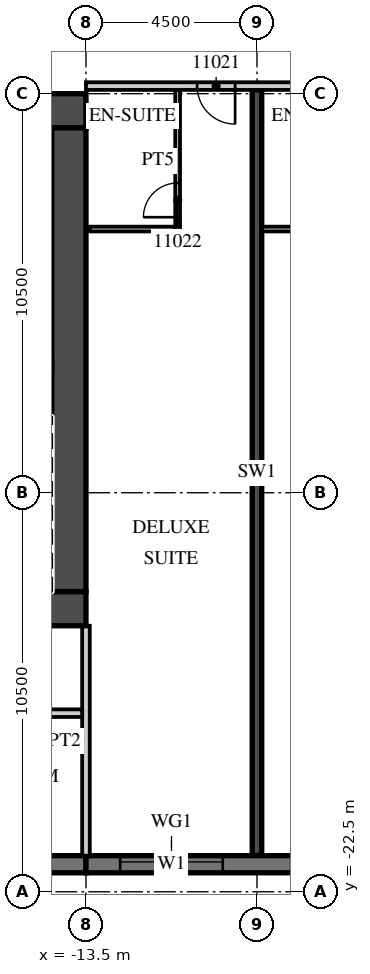
"""IFC4 building model, lengths in metres.
Left out: names, types, materials, properties, quantities, classifications, styles, units other than length and angle.
Written with IfcOpenShell. Run it as: python <this file> out.ifc"""

import sys

from ifc_helpers import new_model, si_unit, direction, frame, frame_2d, origin, place, context, subcontext, project, spatial, rectangle, extrude, element, fill, save


model = new_model("IFC4")
c1 = context("Model", 3, precision=1e-05, world=origin(), true_north=direction((0.0, 1.0)))
c2 = subcontext(c1, "Body", "Model", "MODEL_VIEW")
j1 = project(units=[si_unit("LENGTHUNIT", "METRE"), si_unit("PLANEANGLEUNIT", "RADIAN")], contexts=[c1])
p1 = place(None, origin())
s1 = spatial("IfcSite", under=j1, at=p1, CompositionType="ELEMENT")
p2 = place(p1, origin())
s2 = spatial("IfcBuilding", under=s1, at=p2, CompositionType="ELEMENT")
p3 = place(p2, frame((0.0, 0.0, 66.6)))
s3 = spatial("IfcBuildingStorey", under=s2, at=p3, CompositionType="ELEMENT", Elevation=66.6)
p4 = place(p3, frame((-9.0, -21.54, 0.0), z_axis=(0.0, 0.0, 1.0), x_axis=(0.0, 1.0, 0.0)))
e1 = element("IfcWall", 1, at=p4, inside=s3, PredefinedType="SHEAR", context=c2, shape_type="SweptSolid", body=[
    extrude(rectangle(XDim=20.14, YDim=0.25, at=frame_2d((10.07, 0.0))), origin(), (0.0, 0.0, 1.0), 3.3),
])
p5 = place(p3, frame((-31.5, -21.775, 0.0), z_axis=(0.0, 0.0, 1.0), x_axis=(1.0, 0.0, 0.0)))
e2 = element("IfcWall", 2, at=p5, inside=s3, PredefinedType="SOLIDWALL", context=c2, shape_type="SweptSolid", body=[
    extrude(rectangle(XDim=18.0, YDim=0.45, at=frame_2d((9.0, 0.0))), origin(), (0.0, 0.0, 1.0), 3.02),
])
p6 = place(p3, frame((-13.5, -21.775, 0.0), z_axis=(0.0, 0.0, 1.0), x_axis=(1.0, 0.0, 0.0)))
e3 = element("IfcWall", 3, at=p6, inside=s3, PredefinedType="SOLIDWALL", context=c2, shape_type="SweptSolid", body=[
    extrude(rectangle(XDim=54.5, YDim=0.45, at=frame_2d((27.25, 0.0))), origin(), (0.0, 0.0, 1.0), 3.02),
])
p7 = place(p6, frame((0.9, 0.0, 0.45)))
e4 = element("IfcOpeningElement", 4, at=p7, cuts=e3, PredefinedType="OPENING", context=c2, shape_type="SweptSolid", body=[
    extrude(rectangle(XDim=2.7, YDim=2.25, at=frame_2d((1.35, 1.125))), frame((0.0, 0.235, 0.0), z_axis=(0.0, -1.0, 0.0), x_axis=(1.0, 0.0, 0.0)), (0.0, 0.0, 1.0), 0.47),
])
p8 = place(p6, frame((5.4, 0.0, 0.45)))
e5 = element("IfcOpeningElement", 5, at=p8, cuts=e3, PredefinedType="OPENING", context=c2, shape_type="SweptSolid", body=[
    extrude(rectangle(XDim=2.7, YDim=2.25, at=frame_2d((1.35, 1.125))), frame((0.0, 0.235, 0.0), z_axis=(0.0, -1.0, 0.0), x_axis=(1.0, 0.0, 0.0)), (0.0, 0.0, 1.0), 0.47),
])
p9 = place(p6, frame((9.9, 0.0, 0.45)))
e6 = element("IfcOpeningElement", 6, at=p9, cuts=e3, PredefinedType="OPENING", context=c2, shape_type="SweptSolid", body=[
    extrude(rectangle(XDim=2.7, YDim=2.25, at=frame_2d((1.35, 1.125))), frame((0.0, 0.235, 0.0), z_axis=(0.0, -1.0, 0.0), x_axis=(1.0, 0.0, 0.0)), (0.0, 0.0, 1.0), 0.47),
])
p10 = place(p6, frame((14.4, 0.0, 0.45)))
e7 = element("IfcOpeningElement", 7, at=p10, cuts=e3, PredefinedType="OPENING", context=c2, shape_type="SweptSolid", body=[
    extrude(rectangle(XDim=2.7, YDim=2.25, at=frame_2d((1.35, 1.125))), frame((0.0, 0.235, 0.0), z_axis=(0.0, -1.0, 0.0), x_axis=(1.0, 0.0, 0.0)), (0.0, 0.0, 1.0), 0.47),
])
p11 = place(p6, frame((18.9, 0.0, 0.45)))
e8 = element("IfcOpeningElement", 8, at=p11, cuts=e3, PredefinedType="OPENING", context=c2, shape_type="SweptSolid", body=[
    extrude(rectangle(XDim=2.7, YDim=2.25, at=frame_2d((1.35, 1.125))), frame((0.0, 0.235, 0.0), z_axis=(0.0, -1.0, 0.0), x_axis=(1.0, 0.0, 0.0)), (0.0, 0.0, 1.0), 0.47),
])
p12 = place(p6, frame((23.4, 0.0, 0.45)))
e9 = element("IfcOpeningElement", 9, at=p12, cuts=e3, PredefinedType="OPENING", context=c2, shape_type="SweptSolid", body=[
    extrude(rectangle(XDim=2.7, YDim=2.25, at=frame_2d((1.35, 1.125))), frame((0.0, 0.235, 0.0), z_axis=(0.0, -1.0, 0.0), x_axis=(1.0, 0.0, 0.0)), (0.0, 0.0, 1.0), 0.47),
])
p13 = place(p6, frame((27.9, 0.0, 0.45)))
e10 = element("IfcOpeningElement", 10, at=p13, cuts=e3, PredefinedType="OPENING", context=c2, shape_type="SweptSolid", body=[
    extrude(rectangle(XDim=2.7, YDim=2.25, at=frame_2d((1.35, 1.125))), frame((0.0, 0.235, 0.0), z_axis=(0.0, -1.0, 0.0), x_axis=(1.0, 0.0, 0.0)), (0.0, 0.0, 1.0), 0.47),
])
p14 = place(p6, frame((32.4, 0.0, 0.45)))
e11 = element("IfcOpeningElement", 11, at=p14, cuts=e3, PredefinedType="OPENING", context=c2, shape_type="SweptSolid", body=[
    extrude(rectangle(XDim=2.7, YDim=2.25, at=frame_2d((1.35, 1.125))), frame((0.0, 0.235, 0.0), z_axis=(0.0, -1.0, 0.0), x_axis=(1.0, 0.0, 0.0)), (0.0, 0.0, 1.0), 0.47),
])
p15 = place(p6, frame((36.9, 0.0, 0.45)))
e12 = element("IfcOpeningElement", 12, at=p15, cuts=e3, PredefinedType="OPENING", context=c2, shape_type="SweptSolid", body=[
    extrude(rectangle(XDim=2.7, YDim=2.25, at=frame_2d((1.35, 1.125))), frame((0.0, 0.235, 0.0), z_axis=(0.0, -1.0, 0.0), x_axis=(1.0, 0.0, 0.0)), (0.0, 0.0, 1.0), 0.47),
])
p16 = place(p6, frame((41.4, 0.0, 0.45)))
e13 = element("IfcOpeningElement", 13, at=p16, cuts=e3, PredefinedType="OPENING", context=c2, shape_type="SweptSolid", body=[
    extrude(rectangle(XDim=2.7, YDim=2.25, at=frame_2d((1.35, 1.125))), frame((0.0, 0.235, 0.0), z_axis=(0.0, -1.0, 0.0), x_axis=(1.0, 0.0, 0.0)), (0.0, 0.0, 1.0), 0.47),
])
p17 = place(p6, frame((45.9, 0.0, 0.45)))
e14 = element("IfcOpeningElement", 14, at=p17, cuts=e3, PredefinedType="OPENING", context=c2, shape_type="SweptSolid", body=[
    extrude(rectangle(XDim=2.7, YDim=2.25, at=frame_2d((1.35, 1.125))), frame((0.0, 0.235, 0.0), z_axis=(0.0, -1.0, 0.0), x_axis=(1.0, 0.0, 0.0)), (0.0, 0.0, 1.0), 0.47),
])
p18 = place(p6, frame((50.4, 0.0, 0.45)))
e15 = element("IfcOpeningElement", 15, at=p18, cuts=e3, PredefinedType="OPENING", context=c2, shape_type="SweptSolid", body=[
    extrude(rectangle(XDim=2.7, YDim=2.25, at=frame_2d((1.35, 1.125))), frame((0.0, 0.235, 0.0), z_axis=(0.0, -1.0, 0.0), x_axis=(1.0, 0.0, 0.0)), (0.0, 0.0, 1.0), 0.47),
])
p19 = place(p3, frame((-13.5, -21.55, 0.0), z_axis=(0.0, 0.0, 1.0), x_axis=(0.0, 1.0, 0.0)))
e16 = element("IfcWall", 16, at=p19, inside=s3, PredefinedType="PARTITIONING", context=c2, shape_type="SweptSolid", body=[
    extrude(rectangle(XDim=6.05, YDim=0.2, at=frame_2d((3.025, 0.0))), origin(), (0.0, 0.0, 1.0), 3.02),
])
p20 = place(p3, frame((-13.5, -1.3, 0.0), z_axis=(0.0, 0.0, 1.0), x_axis=(1.0, 0.0, 0.0)))
e17 = element("IfcWall", 17, at=p20, inside=s3, PredefinedType="PARTITIONING", context=c2, shape_type="SweptSolid", body=[
    extrude(rectangle(XDim=58.05, YDim=0.2, at=frame_2d((29.025, 0.0))), origin(), (0.0, 0.0, 1.0), 3.02),
])
p21 = place(p20, frame((2.925, 0.0, 0.0)))
e18 = element("IfcOpeningElement", 18, at=p21, cuts=e17, PredefinedType="OPENING", context=c2, shape_type="SweptSolid", body=[
    extrude(rectangle(XDim=1.0, YDim=2.1, at=frame_2d((0.5, 1.05))), frame((0.0, 0.11, 0.0), z_axis=(0.0, -1.0, 0.0), x_axis=(1.0, 0.0, 0.0)), (0.0, 0.0, 1.0), 0.22),
])
p22 = place(p20, frame((9.863, 0.0, 0.0)))
e19 = element("IfcOpeningElement", 19, at=p22, cuts=e17, PredefinedType="OPENING", context=c2, shape_type="SweptSolid", body=[
    extrude(rectangle(XDim=1.2, YDim=2.1, at=frame_2d((0.6, 1.05))), frame((0.0, 0.11, 0.0), z_axis=(0.0, -1.0, 0.0), x_axis=(1.0, 0.0, 0.0)), (0.0, 0.0, 1.0), 0.22),
])
p23 = place(p20, frame((16.45, 0.0, 0.0)))
e20 = element("IfcOpeningElement", 20, at=p23, cuts=e17, PredefinedType="OPENING", context=c2, shape_type="SweptSolid", body=[
    extrude(rectangle(XDim=1.0, YDim=2.1, at=frame_2d((0.5, 1.05))), frame((0.0, 0.11, 0.0), z_axis=(0.0, -1.0, 0.0), x_axis=(1.0, 0.0, 0.0)), (0.0, 0.0, 1.0), 0.22),
])
p24 = place(p20, frame((18.55, 0.0, 0.0)))
e21 = element("IfcOpeningElement", 21, at=p24, cuts=e17, PredefinedType="OPENING", context=c2, shape_type="SweptSolid", body=[
    extrude(rectangle(XDim=1.0, YDim=2.1, at=frame_2d((0.5, 1.05))), frame((0.0, 0.11, 0.0), z_axis=(0.0, -1.0, 0.0), x_axis=(1.0, 0.0, 0.0)), (0.0, 0.0, 1.0), 0.22),
])
p25 = place(p20, frame((24.938, 0.0, 0.0)))
e22 = element("IfcOpeningElement", 22, at=p25, cuts=e17, PredefinedType="OPENING", context=c2, shape_type="SweptSolid", body=[
    extrude(rectangle(XDim=1.2, YDim=2.1, at=frame_2d((0.6, 1.05))), frame((0.0, 0.11, 0.0), z_axis=(0.0, -1.0, 0.0), x_axis=(1.0, 0.0, 0.0)), (0.0, 0.0, 1.0), 0.22),
])
p26 = place(p20, frame((33.938, 0.0, 0.0)))
e23 = element("IfcOpeningElement", 23, at=p26, cuts=e17, PredefinedType="OPENING", context=c2, shape_type="SweptSolid", body=[
    extrude(rectangle(XDim=1.2, YDim=2.1, at=frame_2d((0.6, 1.05))), frame((0.0, 0.11, 0.0), z_axis=(0.0, -1.0, 0.0), x_axis=(1.0, 0.0, 0.0)), (0.0, 0.0, 1.0), 0.22),
])
p27 = place(p20, frame((42.938, 0.0, 0.0)))
e24 = element("IfcOpeningElement", 24, at=p27, cuts=e17, PredefinedType="OPENING", context=c2, shape_type="SweptSolid", body=[
    extrude(rectangle(XDim=1.2, YDim=2.1, at=frame_2d((0.6, 1.05))), frame((0.0, 0.11, 0.0), z_axis=(0.0, -1.0, 0.0), x_axis=(1.0, 0.0, 0.0)), (0.0, 0.0, 1.0), 0.22),
])
p28 = place(p20, frame((52.425, 0.0, 0.0)))
e25 = element("IfcOpeningElement", 25, at=p28, cuts=e17, PredefinedType="OPENING", context=c2, shape_type="SweptSolid", body=[
    extrude(rectangle(XDim=1.0, YDim=2.1, at=frame_2d((0.5, 1.05))), frame((0.0, 0.11, 0.0), z_axis=(0.0, -1.0, 0.0), x_axis=(1.0, 0.0, 0.0)), (0.0, 0.0, 1.0), 0.22),
])
p29 = place(p20, frame((56.525, 0.0, 0.0)))
e26 = element("IfcOpeningElement", 26, at=p29, cuts=e17, PredefinedType="OPENING", context=c2, shape_type="SweptSolid", body=[
    extrude(rectangle(XDim=1.0, YDim=2.1, at=frame_2d((0.5, 1.05))), frame((0.0, 0.11, 0.0), z_axis=(0.0, -1.0, 0.0), x_axis=(1.0, 0.0, 0.0)), (0.0, 0.0, 1.0), 0.22),
])
p30 = place(p3, frame((-11.088, -5.125, 0.0), z_axis=(0.0, 0.0, 1.0), x_axis=(0.0, 1.0, 0.0)))
e27 = element("IfcWall", 27, at=p30, inside=s3, PredefinedType="PARTITIONING", context=c2, shape_type="SweptSolid", body=[
    extrude(rectangle(XDim=3.725, YDim=0.125, at=frame_2d((1.863, 0.0))), origin(), (0.0, 0.0, 1.0), 3.02),
])
p31 = place(p30, frame((0.375, 0.0, 0.0)))
e28 = element("IfcOpeningElement", 28, at=p31, cuts=e27, PredefinedType="OPENING", context=c2, shape_type="SweptSolid", body=[
    extrude(rectangle(XDim=0.9, YDim=2.1, at=frame_2d((0.45, 1.05))), frame((0.0, 0.073, 0.0), z_axis=(0.0, -1.0, 0.0), x_axis=(1.0, 0.0, 0.0)), (0.0, 0.0, 1.0), 0.145),
])
p32 = place(p3, frame((-13.4, -5.062, 0.0), z_axis=(0.0, 0.0, 1.0), x_axis=(1.0, 0.0, 0.0)))
e29 = element("IfcWall", 29, at=p32, inside=s3, PredefinedType="PARTITIONING", context=c2, shape_type="SweptSolid", body=[
    extrude(rectangle(XDim=2.25, YDim=0.125, at=frame_2d((1.125, 0.0))), origin(), (0.0, 0.0, 1.0), 3.02),
])
p33 = place(p3, frame((-8.875, -5.062, 0.0), z_axis=(0.0, 0.0, 1.0), x_axis=(1.0, 0.0, 0.0)))
e30 = element("IfcWall", 30, at=p33, inside=s3, PredefinedType="PARTITIONING", context=c2, shape_type="SweptSolid", body=[
    extrude(rectangle(XDim=2.8, YDim=0.125, at=frame_2d((1.4, 0.0))), origin(), (0.0, 0.0, 1.0), 3.02),
])
p34 = place(p3, frame((-31.5, -1.95, 0.0), z_axis=(0.0, 0.0, 1.0), x_axis=(1.0, 0.0, 0.0)))
e31 = element("IfcWall", 31, at=p34, inside=s3, PredefinedType="SHEAR", context=c2, shape_type="SweptSolid", body=[
    extrude(rectangle(XDim=18.0, YDim=0.9, at=frame_2d((9.0, 0.0))), origin(), (0.0, 0.0, 1.0), 3.02),
])
p35 = place(p34, frame((14.725, 0.0, 0.0)))
e32 = element("IfcOpeningElement", 32, at=p35, cuts=e31, PredefinedType="OPENING", context=c2, shape_type="SweptSolid", body=[
    extrude(rectangle(XDim=1.8, YDim=2.1, at=frame_2d((0.9, 1.05))), frame((0.0, 0.46, 0.0), z_axis=(0.0, -1.0, 0.0), x_axis=(1.0, 0.0, 0.0)), (0.0, 0.0, 1.0), 0.92),
])
p36 = place(p3, frame((-20.3, -15.05, 0.0), z_axis=(0.0, 0.0, 1.0), x_axis=(1.0, 0.0, 0.0)))
e33 = element("IfcWall", 33, at=p36, inside=s3, PredefinedType="SHEAR", context=c2, shape_type="SweptSolid", body=[
    extrude(rectangle(XDim=6.8, YDim=0.9, at=frame_2d((3.4, 0.0))), origin(), (0.0, 0.0, 1.0), 3.02),
])
p37 = place(p36, frame((0.875, 0.0, 0.0)))
e34 = element("IfcOpeningElement", 34, at=p37, cuts=e33, PredefinedType="OPENING", context=c2, shape_type="SweptSolid", body=[
    extrude(rectangle(XDim=1.2, YDim=2.1, at=frame_2d((0.6, 1.05))), frame((0.0, 0.46, 0.0), z_axis=(0.0, -1.0, 0.0), x_axis=(1.0, 0.0, 0.0)), (0.0, 0.0, 1.0), 0.92),
])
p38 = place(p3, frame((-13.95, -14.6, 0.0), z_axis=(0.0, 0.0, 1.0), x_axis=(0.0, 1.0, 0.0)))
e35 = element("IfcWall", 35, at=p38, inside=s3, PredefinedType="SHEAR", context=c2, shape_type="SweptSolid", body=[
    extrude(rectangle(XDim=12.2, YDim=0.9, at=frame_2d((6.1, 0.0))), origin(), (0.0, 0.0, 1.0), 3.02),
])
p39 = place(p3, frame((-44.55, -17.8, 0.0), z_axis=(0.0, 0.0, 1.0), x_axis=(1.0, 0.0, 0.0)))
e36 = element("IfcWall", 36, at=p39, inside=s3, PredefinedType="PARTITIONING", context=c2, shape_type="SweptSolid", body=[
    extrude(rectangle(XDim=30.95, YDim=0.2, at=frame_2d((15.475, 0.0))), origin(), (0.0, 0.0, 1.0), 3.02),
])
p40 = place(p39, frame((13.438, 0.0, 0.0)))
e37 = element("IfcOpeningElement", 37, at=p40, cuts=e36, PredefinedType="OPENING", context=c2, shape_type="SweptSolid", body=[
    extrude(rectangle(XDim=0.9, YDim=2.1, at=frame_2d((0.45, 1.05))), frame((0.0, 0.11, 0.0), z_axis=(0.0, -1.0, 0.0), x_axis=(1.0, 0.0, 0.0)), (0.0, 0.0, 1.0), 0.22),
])
p41 = place(p39, frame((21.738, 0.0, 0.0)))
e38 = element("IfcOpeningElement", 38, at=p41, cuts=e36, PredefinedType="OPENING", context=c2, shape_type="SweptSolid", body=[
    extrude(rectangle(XDim=0.9, YDim=2.1, at=frame_2d((0.45, 1.05))), frame((0.0, 0.11, 0.0), z_axis=(0.0, -1.0, 0.0), x_axis=(1.0, 0.0, 0.0)), (0.0, 0.0, 1.0), 0.22),
])
p42 = place(p7, origin())
e39 = element("IfcWindow", 39, at=p42, inside=s3, PartitioningType="SINGLE_PANEL", PredefinedType="WINDOW", context=c2, shape_type="SweptSolid", body=[
    extrude(rectangle(XDim=2.7, YDim=2.25, at=frame_2d((1.35, 1.125))), frame((0.0, 0.09, 0.0), z_axis=(0.0, -1.0, 0.0), x_axis=(1.0, 0.0, 0.0)), (0.0, 0.0, 1.0), 0.06),
])
fill(e4, e39)
p43 = place(p21, origin())
e40 = element("IfcDoor", 40, at=p43, inside=s3, OperationType="SINGLE_SWING_RIGHT", PredefinedType="DOOR", context=c2, shape_type="SweptSolid", body=[
    extrude(rectangle(XDim=1.0, YDim=2.1, at=frame_2d((0.5, 1.05))), frame((0.0, 0.025, 0.0), z_axis=(0.0, -1.0, 0.0), x_axis=(1.0, 0.0, 0.0)), (0.0, 0.0, 1.0), 0.05),
])
fill(e18, e40)
p44 = place(p31, origin())
e41 = element("IfcDoor", 41, at=p44, inside=s3, OperationType="SINGLE_SWING_LEFT", PredefinedType="DOOR", context=c2, shape_type="SweptSolid", body=[
    extrude(rectangle(XDim=0.9, YDim=2.1, at=frame_2d((0.45, 1.05))), frame((0.0, 0.025, 0.0), z_axis=(0.0, -1.0, 0.0), x_axis=(1.0, 0.0, 0.0)), (0.0, 0.0, 1.0), 0.05),
])
fill(e28, e41)
save(model, sys.argv[1])
